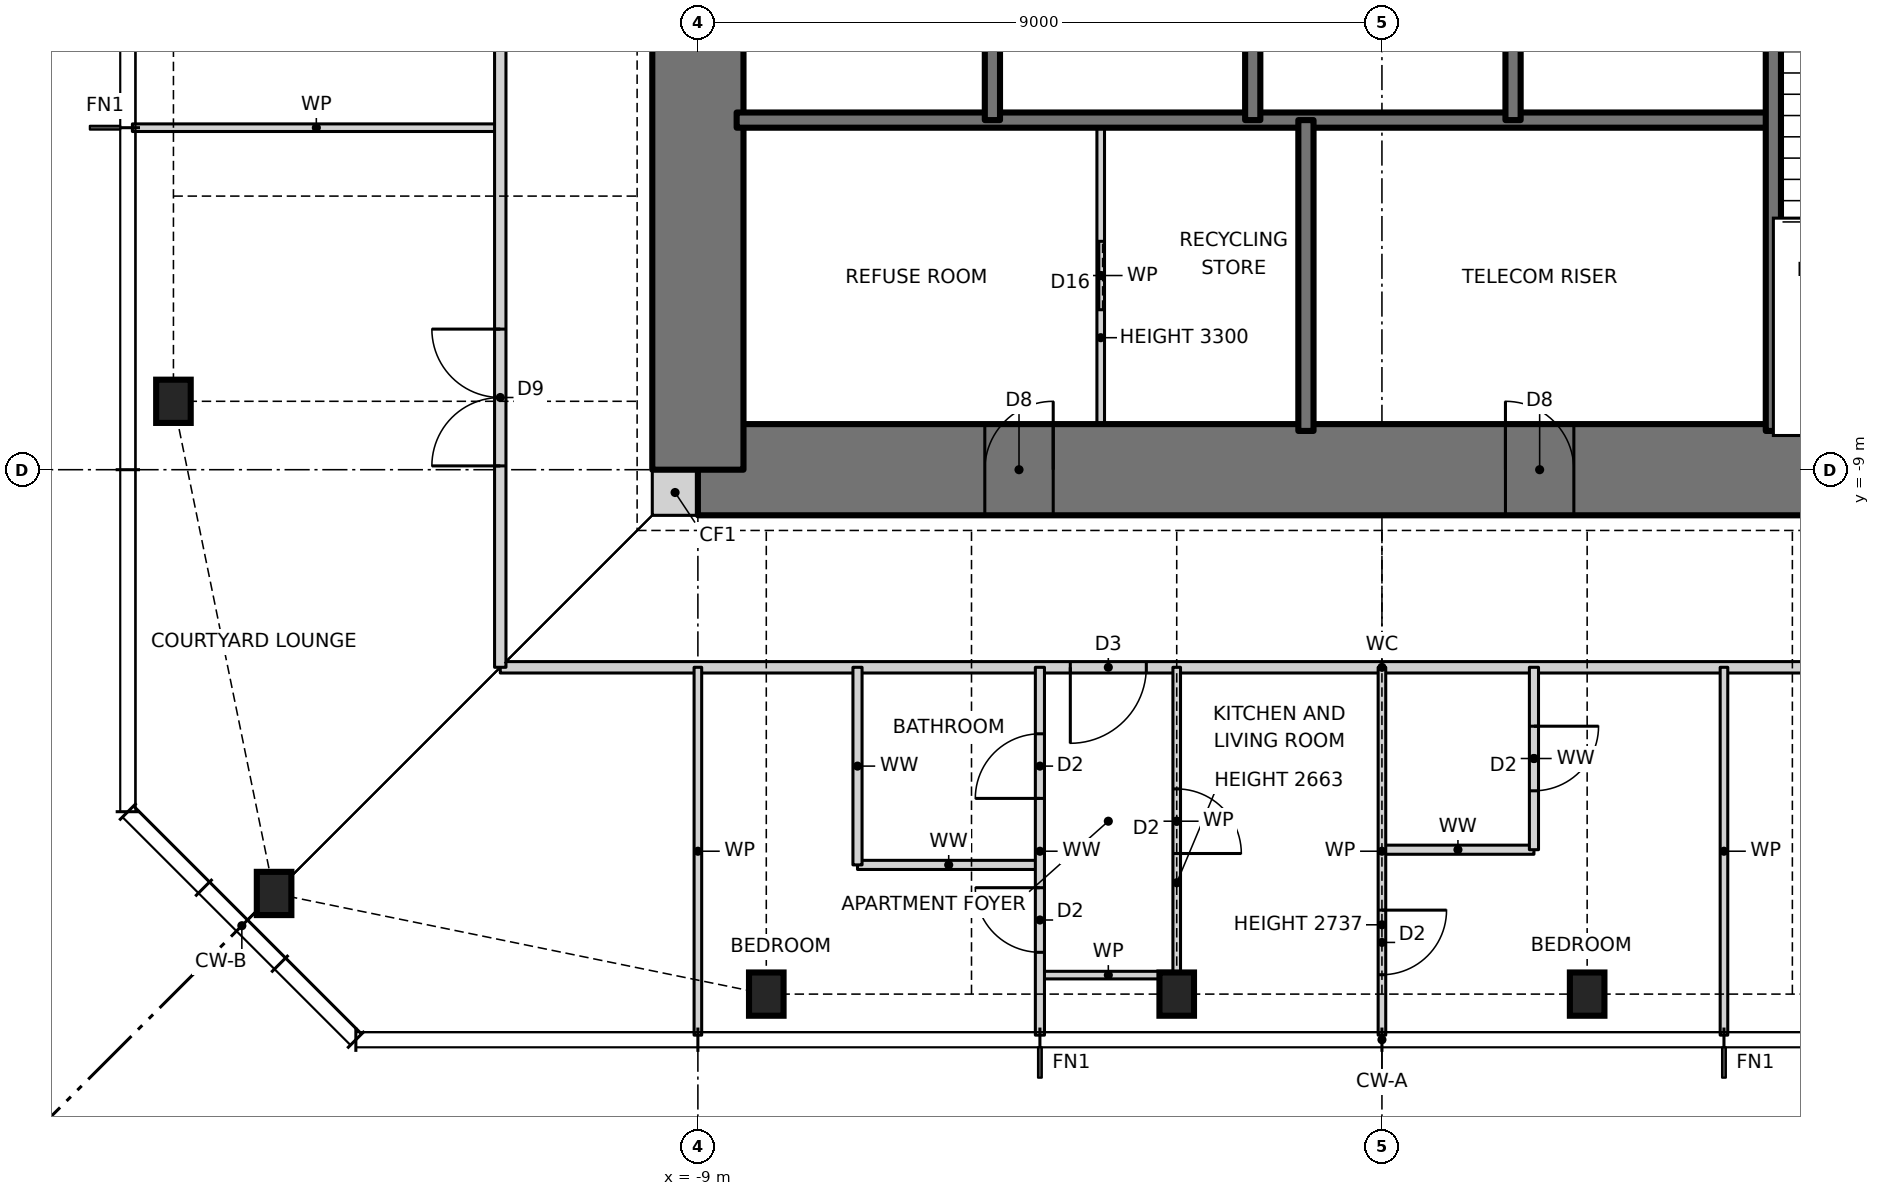
"""IFC4 building model, lengths in metres.
Left out: names, types, materials, properties, quantities, classifications, styles, units other than length and angle.
Written with IfcOpenShell. Run it as: python <this file> out.ifc"""

import sys

from ifc_helpers import new_model, si_unit, direction, frame, frame_2d, origin, origin_2d, place, context, subcontext, project, spatial, rectangle, i_section, extrude, element, fill, save


model = new_model("IFC4")
c1 = context("Model", 3, precision=1e-05, world=origin(), true_north=direction((0.0, 1.0)))
c2 = subcontext(c1, "Body", "Model", "MODEL_VIEW")
j1 = project(units=[si_unit("LENGTHUNIT", "METRE"), si_unit("PLANEANGLEUNIT", "RADIAN")], contexts=[c1])
p1 = place(None, origin())
s1 = spatial("IfcSite", under=j1, at=p1, CompositionType="ELEMENT")
p2 = place(p1, origin())
s2 = spatial("IfcBuilding", under=s1, at=p2, CompositionType="ELEMENT")
p3 = place(p2, frame((0.0, 0.0, 257.0)))
s3 = spatial("IfcBuildingStorey", under=s2, at=p3, CompositionType="ELEMENT", Elevation=257.0)
for number, where, z_axis, x_axis in (
    (1, (-14.576, -14.576, 0.0), (0.0, 0.0, 1.0), (1.0, 0.0, 0.0)),
    (2, (-8.1, -15.9, 0.0), (0.0, 0.0, 1.0), (1.0, 0.0, 0.0)),
    (3, (-2.7, -15.9, 0.0), (0.0, 0.0, 1.0), (1.0, 0.0, 0.0)),
    (4, (2.7, -15.9, 0.0), (0.0, 0.0, 1.0), (1.0, 0.0, 0.0)),
    (5, (-15.9, -8.1, 0.0), (0.0, 0.0, 1.0), (1.0, 0.0, 0.0)),
):
    element("IfcColumn", number, at=place(p3, frame(where, z_axis=z_axis, x_axis=x_axis)), inside=s3, PredefinedType="COLUMN", context=c2, shape_type="SweptSolid", body=[
        extrude(i_section(OverallWidth=0.455, OverallDepth=0.569, WebThickness=0.078, FlangeThickness=0.125, at=origin_2d()), origin(), (0.0, 0.0, 1.0), 3.5),
    ])
p4 = place(p3, frame((-9.6, -9.3, 0.0), z_axis=(0.0, 0.0, 1.0), x_axis=(1.0, 0.0, 0.0)))
e6 = element("IfcWall", 6, at=p4, inside=s3, PredefinedType="SOLIDWALL", context=c2, shape_type="SweptSolid", body=[
    extrude(rectangle(XDim=0.6, YDim=0.6, at=frame_2d((0.3, 0.0))), origin(), (0.0, 0.0, 1.0), 3.5),
])
p5 = place(p3, frame((-9.0, -9.0, 0.0), z_axis=(0.0, 0.0, 1.0), x_axis=(1.0, 0.0, 0.0)))
e7 = element("IfcWall", 7, at=p5, inside=s3, PredefinedType="SHEAR", context=c2, shape_type="SweptSolid", body=[
    extrude(rectangle(XDim=18.0, YDim=1.2, at=frame_2d((9.0, 0.0))), origin(), (0.0, 0.0, 1.0), 3.5),
])
p6 = place(p5, frame((3.775, 0.0, 0.0)))
e8 = element("IfcOpeningElement", 8, at=p6, cuts=e7, PredefinedType="OPENING", context=c2, shape_type="SweptSolid", body=[
    extrude(rectangle(XDim=0.9, YDim=2.1, at=frame_2d((0.45, 1.05))), frame((0.0, 0.61, 0.0), z_axis=(0.0, -1.0, 0.0), x_axis=(1.0, 0.0, 0.0)), (0.0, 0.0, 1.0), 1.22),
])
p7 = place(p5, frame((10.625, 0.0, 0.0)))
e9 = element("IfcOpeningElement", 9, at=p7, cuts=e7, PredefinedType="OPENING", context=c2, shape_type="SweptSolid", body=[
    extrude(rectangle(XDim=0.9, YDim=2.1, at=frame_2d((0.45, 1.05))), frame((0.0, 0.61, 0.0), z_axis=(0.0, -1.0, 0.0), x_axis=(1.0, 0.0, 0.0)), (0.0, 0.0, 1.0), 1.22),
])
p8 = place(p3, frame((-9.0, 9.0, 0.0), z_axis=(0.0, 0.0, 1.0), x_axis=(0.0, -1.0, 0.0)))
e10 = element("IfcWall", 10, at=p8, inside=s3, PredefinedType="SHEAR", context=c2, shape_type="SweptSolid", body=[
    extrude(rectangle(XDim=18.0, YDim=1.2, at=frame_2d((9.0, 0.0))), origin(), (0.0, 0.0, 1.0), 3.5),
])
p9 = place(p8, frame((8.5, 0.0, 0.0)))
e11 = element("IfcOpeningElement", 11, at=p9, cuts=e10, PredefinedType="OPENING", context=c2, shape_type="SweptSolid", body=[
    extrude(rectangle(XDim=1.0, YDim=2.1, at=frame_2d((0.5, 1.05))), frame((0.0, 0.61, 0.0), z_axis=(0.0, -1.0, 0.0), x_axis=(1.0, 0.0, 0.0)), (0.0, 0.0, 1.0), 1.22),
])
p10 = place(p3, frame((-4.5, -15.65, 0.0), z_axis=(0.0, 0.0, 1.0), x_axis=(1.0, 0.0, 0.0)))
e12 = element("IfcWall", 12, at=p10, inside=s3, PredefinedType="PARTITIONING", context=c2, shape_type="SweptSolid", body=[
    extrude(rectangle(XDim=1.8, YDim=0.1, at=frame_2d((0.9, 0.0))), origin(), (0.0, 0.0, 1.0), 3.27),
])
p11 = place(p3, frame((-6.9, -14.2, 0.0), z_axis=(0.0, 0.0, 1.0), x_axis=(1.0, 0.0, 0.0)))
e13 = element("IfcWall", 13, at=p11, inside=s3, PredefinedType="PARTITIONING", context=c2, shape_type="SweptSolid", body=[
    extrude(rectangle(XDim=2.4, YDim=0.12, at=frame_2d((1.2, 0.0))), origin(), (0.0, 0.0, 1.0), 3.27),
])
p12 = place(p3, frame((0.0, -14.0, 0.0), z_axis=(0.0, 0.0, 1.0), x_axis=(1.0, 0.0, 0.0)))
e14 = element("IfcWall", 14, at=p12, inside=s3, PredefinedType="PARTITIONING", context=c2, shape_type="SweptSolid", body=[
    extrude(rectangle(XDim=2.0, YDim=0.12, at=frame_2d((1.0, 0.0))), origin(), (0.0, 0.0, 1.0), 3.27),
])
p13 = place(p3, frame((-11.6, -11.6, 0.0), z_axis=(0.0, 0.0, 1.0), x_axis=(1.0, 0.0, 0.0)))
e15 = element("IfcWall", 15, at=p13, inside=s3, PredefinedType="PARTITIONING", context=c2, shape_type="SweptSolid", body=[
    extrude(rectangle(XDim=23.2, YDim=0.15, at=frame_2d((11.6, 0.0))), origin(), (0.0, 0.0, 1.0), 3.27),
])
p14 = place(p13, frame((7.5, 0.0, 0.0)))
e16 = element("IfcOpeningElement", 16, at=p14, cuts=e15, PredefinedType="OPENING", context=c2, shape_type="SweptSolid", body=[
    extrude(rectangle(XDim=1.0, YDim=2.1, at=frame_2d((0.5, 1.05))), frame((0.0, 0.085, 0.0), z_axis=(0.0, -1.0, 0.0), x_axis=(1.0, 0.0, 0.0)), (0.0, 0.0, 1.0), 0.17),
])
p15 = place(p13, frame((19.225, 0.0, 0.0)))
e17 = element("IfcOpeningElement", 17, at=p15, cuts=e15, PredefinedType="OPENING", context=c2, shape_type="SweptSolid", body=[
    extrude(rectangle(XDim=0.85, YDim=2.1, at=frame_2d((0.425, 1.05))), frame((0.0, 0.085, 0.0), z_axis=(0.0, -1.0, 0.0), x_axis=(1.0, 0.0, 0.0)), (0.0, 0.0, 1.0), 0.17),
])
p16 = place(p3, frame((-16.44, -4.5, 0.0), z_axis=(0.0, 0.0, 1.0), x_axis=(1.0, 0.0, 0.0)))
e18 = element("IfcWall", 18, at=p16, inside=s3, PredefinedType="PARTITIONING", context=c2, shape_type="SweptSolid", body=[
    extrude(rectangle(XDim=4.84, YDim=0.1, at=frame_2d((2.42, 0.0))), origin(), (0.0, 0.0, 1.0), 3.27),
])
p17 = place(p3, frame((-8.49, -4.4, 0.0), z_axis=(0.0, 0.0, 1.0), x_axis=(1.0, 0.0, 0.0)))
e19 = element("IfcWall", 19, at=p17, inside=s3, PredefinedType="SOLIDWALL", context=c2, shape_type="SweptSolid", body=[
    extrude(rectangle(XDim=13.64, YDim=0.2, at=frame_2d((6.82, 0.0))), origin(), (0.0, 0.0, 1.0), 3.5),
])
p18 = place(p3, frame((5.15, -8.49, 0.0), z_axis=(0.0, 0.0, 1.0), x_axis=(0.0, 1.0, 0.0)))
e20 = element("IfcWall", 20, at=p18, inside=s3, PredefinedType="SOLIDWALL", context=c2, shape_type="SweptSolid", body=[
    extrude(rectangle(XDim=13.09, YDim=0.2, at=frame_2d((6.545, 0.0))), origin(), (0.0, 0.0, 1.0), 3.5),
])
p19 = place(p18, frame((7.89, 0.0, 0.0)))
e21 = element("IfcOpeningElement", 21, at=p19, cuts=e20, PredefinedType="OPENING", context=c2, shape_type="SweptSolid", body=[
    extrude(rectangle(XDim=1.2, YDim=2.1, at=frame_2d((0.6, 1.05))), frame((0.0, 0.11, 0.0), z_axis=(0.0, -1.0, 0.0), x_axis=(1.0, 0.0, 0.0)), (0.0, 0.0, 1.0), 0.22),
])
p20 = place(p3, frame((4.5, -16.44, 0.0), z_axis=(0.0, 0.0, 1.0), x_axis=(0.0, 1.0, 0.0)))
e22 = element("IfcWall", 22, at=p20, inside=s3, PredefinedType="PARTITIONING", context=c2, shape_type="SweptSolid", body=[
    extrude(rectangle(XDim=4.84, YDim=0.1, at=frame_2d((2.42, 0.0))), origin(), (0.0, 0.0, 1.0), 3.27),
])
p21 = place(p3, frame((2.0, -14.0, 0.0), z_axis=(0.0, 0.0, 1.0), x_axis=(0.0, 1.0, 0.0)))
e23 = element("IfcWall", 23, at=p21, inside=s3, PredefinedType="PARTITIONING", context=c2, shape_type="SweptSolid", body=[
    extrude(rectangle(XDim=2.4, YDim=0.12, at=frame_2d((1.2, 0.0))), origin(), (0.0, 0.0, 1.0), 3.27),
])
p22 = place(p21, frame((0.775, 0.0, 0.0)))
e24 = element("IfcOpeningElement", 24, at=p22, cuts=e23, PredefinedType="OPENING", context=c2, shape_type="SweptSolid", body=[
    extrude(rectangle(XDim=0.85, YDim=2.1, at=frame_2d((0.425, 1.05))), frame((0.0, 0.07, 0.0), z_axis=(0.0, -1.0, 0.0), x_axis=(1.0, 0.0, 0.0)), (0.0, 0.0, 1.0), 0.14),
])
p23 = place(p3, frame((1.725, -4.4, 0.0), z_axis=(0.0, 0.0, 1.0), x_axis=(0.0, 1.0, 0.0)))
e25 = element("IfcWall", 25, at=p23, inside=s3, PredefinedType="SOLIDWALL", context=c2, shape_type="SweptSolid", body=[
    extrude(rectangle(XDim=2.8, YDim=0.2, at=frame_2d((1.4, 0.0))), origin(), (0.0, 0.0, 1.0), 3.5),
])
p24 = place(p3, frame((0.0, -16.44, 0.0), z_axis=(0.0, 0.0, 1.0), x_axis=(0.0, 1.0, 0.0)))
e26 = element("IfcWall", 26, at=p24, inside=s3, PredefinedType="PARTITIONING", context=c2, shape_type="SweptSolid", body=[
    extrude(rectangle(XDim=4.84, YDim=0.1, at=frame_2d((2.42, 0.0))), origin(), (0.0, 0.0, 1.0), 2.737),
])
p25 = place(p24, frame((0.795, 0.0, 0.0)))
e27 = element("IfcOpeningElement", 27, at=p25, cuts=e26, PredefinedType="OPENING", context=c2, shape_type="SweptSolid", body=[
    extrude(rectangle(XDim=0.85, YDim=2.1, at=frame_2d((0.425, 1.05))), frame((0.0, 0.06, 0.0), z_axis=(0.0, -1.0, 0.0), x_axis=(1.0, 0.0, 0.0)), (0.0, 0.0, 1.0), 0.12),
])
p26 = place(p3, frame((-1.0, -8.49, 0.0), z_axis=(0.0, 0.0, 1.0), x_axis=(0.0, 1.0, 0.0)))
e28 = element("IfcWall", 28, at=p26, inside=s3, PredefinedType="SOLIDWALL", context=c2, shape_type="SweptSolid", body=[
    extrude(rectangle(XDim=4.09, YDim=0.2, at=frame_2d((2.045, 0.0))), origin(), (0.0, 0.0, 1.0), 3.5),
])
p27 = place(p3, frame((-1.7, -4.4, 0.0), z_axis=(0.0, 0.0, 1.0), x_axis=(0.0, 1.0, 0.0)))
e29 = element("IfcWall", 29, at=p27, inside=s3, PredefinedType="SOLIDWALL", context=c2, shape_type="SweptSolid", body=[
    extrude(rectangle(XDim=2.8, YDim=0.2, at=frame_2d((1.4, 0.0))), origin(), (0.0, 0.0, 1.0), 3.5),
])
p28 = place(p3, frame((-2.7, -15.65, 0.0), z_axis=(0.0, 0.0, 1.0), x_axis=(0.0, 1.0, 0.0)))
e30 = element("IfcWall", 30, at=p28, inside=s3, PredefinedType="PARTITIONING", context=c2, shape_type="SweptSolid", body=[
    extrude(rectangle(XDim=4.05, YDim=0.1, at=frame_2d((2.025, 0.0))), origin(), (0.0, 0.0, 1.0), 2.663),
])
p29 = place(p28, frame((1.6, 0.0, 0.0)))
e31 = element("IfcOpeningElement", 31, at=p29, cuts=e30, PredefinedType="OPENING", context=c2, shape_type="SweptSolid", body=[
    extrude(rectangle(XDim=0.85, YDim=2.1, at=frame_2d((0.425, 1.05))), frame((0.0, 0.06, 0.0), z_axis=(0.0, -1.0, 0.0), x_axis=(1.0, 0.0, 0.0)), (0.0, 0.0, 1.0), 0.12),
])
p30 = place(p3, frame((-3.7, -8.49, 0.0), z_axis=(0.0, 0.0, 1.0), x_axis=(0.0, 1.0, 0.0)))
e32 = element("IfcWall", 32, at=p30, inside=s3, PredefinedType="PARTITIONING", context=c2, shape_type="SweptSolid", body=[
    extrude(rectangle(XDim=4.09, YDim=0.1, at=frame_2d((2.045, 0.0))), origin(), (0.0, 0.0, 1.0), 3.3),
])
p31 = place(p30, frame((1.595, 0.0, 0.0)))
e33 = element("IfcOpeningElement", 33, at=p31, cuts=e32, PredefinedType="OPENING", context=c2, shape_type="SweptSolid", body=[
    extrude(rectangle(XDim=0.9, YDim=2.1, at=frame_2d((0.45, 1.05))), frame((0.0, 0.06, 0.0), z_axis=(0.0, -1.0, 0.0), x_axis=(1.0, 0.0, 0.0)), (0.0, 0.0, 1.0), 0.12),
])
p32 = place(p3, frame((-4.5, -16.44, 0.0), z_axis=(0.0, 0.0, 1.0), x_axis=(0.0, 1.0, 0.0)))
e34 = element("IfcWall", 34, at=p32, inside=s3, PredefinedType="PARTITIONING", context=c2, shape_type="SweptSolid", body=[
    extrude(rectangle(XDim=4.84, YDim=0.12, at=frame_2d((2.42, 0.0))), origin(), (0.0, 0.0, 1.0), 3.27),
])
p33 = place(p32, frame((1.09, 0.0, 0.0)))
e35 = element("IfcOpeningElement", 35, at=p33, cuts=e34, PredefinedType="OPENING", context=c2, shape_type="SweptSolid", body=[
    extrude(rectangle(XDim=0.85, YDim=2.1, at=frame_2d((0.425, 1.05))), frame((0.0, 0.07, 0.0), z_axis=(0.0, -1.0, 0.0), x_axis=(1.0, 0.0, 0.0)), (0.0, 0.0, 1.0), 0.14),
])
p34 = place(p32, frame((3.115, 0.0, 0.0)))
e36 = element("IfcOpeningElement", 36, at=p34, cuts=e34, PredefinedType="OPENING", context=c2, shape_type="SweptSolid", body=[
    extrude(rectangle(XDim=0.85, YDim=2.1, at=frame_2d((0.425, 1.05))), frame((0.0, 0.07, 0.0), z_axis=(0.0, -1.0, 0.0), x_axis=(1.0, 0.0, 0.0)), (0.0, 0.0, 1.0), 0.14),
])
p35 = place(p3, frame((-5.125, -4.4, 0.0), z_axis=(0.0, 0.0, 1.0), x_axis=(0.0, 1.0, 0.0)))
e37 = element("IfcWall", 37, at=p35, inside=s3, PredefinedType="SOLIDWALL", context=c2, shape_type="SweptSolid", body=[
    extrude(rectangle(XDim=2.8, YDim=0.2, at=frame_2d((1.4, 0.0))), origin(), (0.0, 0.0, 1.0), 3.5),
])
p36 = place(p3, frame((-6.9, -14.2, 0.0), z_axis=(0.0, 0.0, 1.0), x_axis=(0.0, 1.0, 0.0)))
e38 = element("IfcWall", 38, at=p36, inside=s3, PredefinedType="PARTITIONING", context=c2, shape_type="SweptSolid", body=[
    extrude(rectangle(XDim=2.6, YDim=0.12, at=frame_2d((1.3, 0.0))), origin(), (0.0, 0.0, 1.0), 3.27),
])
p37 = place(p3, frame((-9.0, -16.44, 0.0), z_axis=(0.0, 0.0, 1.0), x_axis=(0.0, 1.0, 0.0)))
e39 = element("IfcWall", 39, at=p37, inside=s3, PredefinedType="PARTITIONING", context=c2, shape_type="SweptSolid", body=[
    extrude(rectangle(XDim=4.84, YDim=0.1, at=frame_2d((2.42, 0.0))), origin(), (0.0, 0.0, 1.0), 3.27),
])
p38 = place(p3, frame((-11.6, -11.6, 0.0), z_axis=(0.0, 0.0, 1.0), x_axis=(0.0, 1.0, 0.0)))
e40 = element("IfcWall", 40, at=p38, inside=s3, PredefinedType="PARTITIONING", context=c2, shape_type="SweptSolid", body=[
    extrude(rectangle(XDim=23.2, YDim=0.15, at=frame_2d((11.6, 0.0))), origin(), (0.0, 0.0, 1.0), 3.27),
])
p39 = place(p38, frame((17.45, 0.0, 0.0)))
e41 = element("IfcOpeningElement", 41, at=p39, cuts=e40, PredefinedType="OPENING", context=c2, shape_type="SweptSolid", body=[
    extrude(rectangle(XDim=1.8, YDim=2.1, at=frame_2d((0.9, 1.05))), frame((0.0, 0.085, 0.0), z_axis=(0.0, -1.0, 0.0), x_axis=(1.0, 0.0, 0.0)), (0.0, 0.0, 1.0), 0.17),
])
p40 = place(p38, frame((12.0, 0.0, 0.0)))
e42 = element("IfcOpeningElement", 42, at=p40, cuts=e40, PredefinedType="OPENING", context=c2, shape_type="SweptSolid", body=[
    extrude(rectangle(XDim=1.0, YDim=2.1, at=frame_2d((0.5, 1.05))), frame((0.0, 0.085, 0.0), z_axis=(0.0, -1.0, 0.0), x_axis=(1.0, 0.0, 0.0)), (0.0, 0.0, 1.0), 0.17),
])
p41 = place(p38, frame((2.65, 0.0, 0.0)))
e43 = element("IfcOpeningElement", 43, at=p41, cuts=e40, PredefinedType="OPENING", context=c2, shape_type="SweptSolid", body=[
    extrude(rectangle(XDim=1.8, YDim=2.1, at=frame_2d((0.9, 1.05))), frame((0.0, 0.085, 0.0), z_axis=(0.0, -1.0, 0.0), x_axis=(1.0, 0.0, 0.0)), (0.0, 0.0, 1.0), 0.17),
])
p42 = place(p31, origin())
e44 = element("IfcDoor", 44, at=p42, inside=s3, OperationType="SLIDING_TO_LEFT", PredefinedType="DOOR", context=c2, shape_type="SweptSolid", body=[
    extrude(rectangle(XDim=0.9, YDim=2.1, at=frame_2d((0.45, 1.05))), frame((0.0, 0.025, 0.0), z_axis=(0.0, -1.0, 0.0), x_axis=(1.0, 0.0, 0.0)), (0.0, 0.0, 1.0), 0.05),
])
fill(e33, e44)
p43 = place(p14, frame((1.0, 0.0, 0.0), z_axis=(0.0, 0.0, 1.0), x_axis=(-1.0, 0.0, 0.0)))
e45 = element("IfcDoor", 45, at=p43, inside=s3, OperationType="SINGLE_SWING_RIGHT", PredefinedType="DOOR", context=c2, shape_type="SweptSolid", body=[
    extrude(rectangle(XDim=1.0, YDim=2.1, at=frame_2d((0.5, 1.05))), frame((0.0, 0.025, 0.0), z_axis=(0.0, -1.0, 0.0), x_axis=(1.0, 0.0, 0.0)), (0.0, 0.0, 1.0), 0.05),
])
fill(e16, e45)
p44 = place(p29, frame((0.85, 0.0, 0.0), z_axis=(0.0, 0.0, 1.0), x_axis=(-1.0, 0.0, 0.0)))
e46 = element("IfcDoor", 46, at=p44, inside=s3, OperationType="SINGLE_SWING_RIGHT", PredefinedType="DOOR", context=c2, shape_type="SweptSolid", body=[
    extrude(rectangle(XDim=0.85, YDim=2.1, at=frame_2d((0.425, 1.05))), frame((0.0, 0.025, 0.0), z_axis=(0.0, -1.0, 0.0), x_axis=(1.0, 0.0, 0.0)), (0.0, 0.0, 1.0), 0.05),
])
fill(e31, e46)
p45 = place(p33, origin())
e47 = element("IfcDoor", 47, at=p45, inside=s3, OperationType="SINGLE_SWING_RIGHT", PredefinedType="DOOR", context=c2, shape_type="SweptSolid", body=[
    extrude(rectangle(XDim=0.85, YDim=2.1, at=frame_2d((0.425, 1.05))), frame((0.0, 0.025, 0.0), z_axis=(0.0, -1.0, 0.0), x_axis=(1.0, 0.0, 0.0)), (0.0, 0.0, 1.0), 0.05),
])
fill(e35, e47)
p46 = place(p34, origin())
e48 = element("IfcDoor", 48, at=p46, inside=s3, OperationType="SINGLE_SWING_LEFT", PredefinedType="DOOR", context=c2, shape_type="SweptSolid", body=[
    extrude(rectangle(XDim=0.85, YDim=2.1, at=frame_2d((0.425, 1.05))), frame((0.0, 0.025, 0.0), z_axis=(0.0, -1.0, 0.0), x_axis=(1.0, 0.0, 0.0)), (0.0, 0.0, 1.0), 0.05),
])
fill(e36, e48)
p47 = place(p25, frame((0.85, 0.0, 0.0), z_axis=(0.0, 0.0, 1.0), x_axis=(-1.0, 0.0, 0.0)))
e49 = element("IfcDoor", 49, at=p47, inside=s3, OperationType="SINGLE_SWING_LEFT", PredefinedType="DOOR", context=c2, shape_type="SweptSolid", body=[
    extrude(rectangle(XDim=0.85, YDim=2.1, at=frame_2d((0.425, 1.05))), frame((0.0, 0.025, 0.0), z_axis=(0.0, -1.0, 0.0), x_axis=(1.0, 0.0, 0.0)), (0.0, 0.0, 1.0), 0.05),
])
fill(e27, e49)
p48 = place(p22, frame((0.85, 0.0, 0.0), z_axis=(0.0, 0.0, 1.0), x_axis=(-1.0, 0.0, 0.0)))
e50 = element("IfcDoor", 50, at=p48, inside=s3, OperationType="SINGLE_SWING_LEFT", PredefinedType="DOOR", context=c2, shape_type="SweptSolid", body=[
    extrude(rectangle(XDim=0.85, YDim=2.1, at=frame_2d((0.425, 1.05))), frame((0.0, 0.025, 0.0), z_axis=(0.0, -1.0, 0.0), x_axis=(1.0, 0.0, 0.0)), (0.0, 0.0, 1.0), 0.05),
])
fill(e24, e50)
p49 = place(p41, origin())
e51 = element("IfcDoor", 51, at=p49, inside=s3, OperationType="DOUBLE_DOOR_SINGLE_SWING", PredefinedType="DOOR", context=c2, shape_type="SweptSolid", body=[
    extrude(rectangle(XDim=1.8, YDim=2.1, at=frame_2d((0.9, 1.05))), frame((0.0, 0.025, 0.0), z_axis=(0.0, -1.0, 0.0), x_axis=(1.0, 0.0, 0.0)), (0.0, 0.0, 1.0), 0.05),
])
fill(e43, e51)
p50 = place(p6, origin())
e52 = element("IfcDoor", 52, at=p50, inside=s3, OperationType="SINGLE_SWING_RIGHT", PredefinedType="DOOR", context=c2, shape_type="SweptSolid", body=[
    extrude(rectangle(XDim=0.9, YDim=2.1, at=frame_2d((0.45, 1.05))), frame((0.0, 0.025, 0.0), z_axis=(0.0, -1.0, 0.0), x_axis=(1.0, 0.0, 0.0)), (0.0, 0.0, 1.0), 0.05),
])
fill(e8, e52)
p51 = place(p7, origin())
e53 = element("IfcDoor", 53, at=p51, inside=s3, OperationType="SINGLE_SWING_LEFT", PredefinedType="DOOR", context=c2, shape_type="SweptSolid", body=[
    extrude(rectangle(XDim=0.9, YDim=2.1, at=frame_2d((0.45, 1.05))), frame((0.0, 0.025, 0.0), z_axis=(0.0, -1.0, 0.0), x_axis=(1.0, 0.0, 0.0)), (0.0, 0.0, 1.0), 0.05),
])
fill(e9, e53)
save(model, sys.argv[1])
